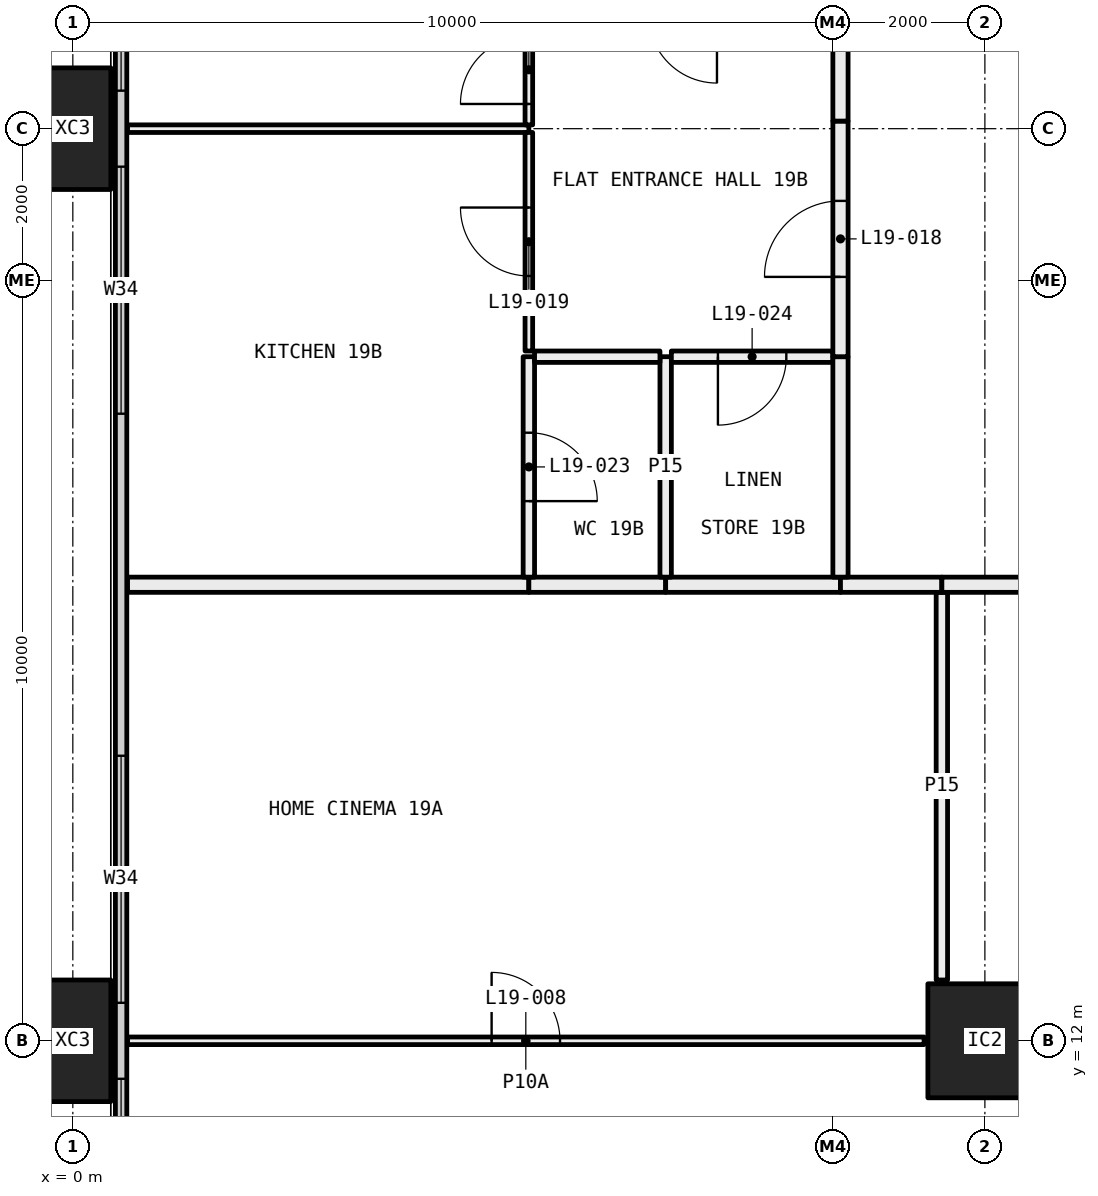
"""IFC4 building model, lengths in metres.
Left out: names, types, materials, properties, quantities, classifications, styles, units other than length and angle.
Written with IfcOpenShell. Run it as: python <this file> out.ifc"""

import sys

from ifc_helpers import new_model, si_unit, direction, frame, frame_2d, origin, origin_2d, place, context, subcontext, project, spatial, rectangle, hollow_rectangle, extrude, element, fill, save


model = new_model("IFC4")
c1 = context("Model", 3, precision=1e-05, world=origin(), true_north=direction((0.0, 1.0)))
c2 = subcontext(c1, "Body", "Model", "MODEL_VIEW")
j1 = project(units=[si_unit("LENGTHUNIT", "METRE"), si_unit("PLANEANGLEUNIT", "RADIAN")], contexts=[c1])
p1 = place(None, origin())
s1 = spatial("IfcSite", under=j1, at=p1, CompositionType="ELEMENT")
p2 = place(p1, origin())
s2 = spatial("IfcBuilding", under=s1, at=p2, CompositionType="ELEMENT")
p3 = place(p2, frame((0.0, 0.0, 78.3)))
s3 = spatial("IfcBuildingStorey", under=s2, at=p3, CompositionType="ELEMENT", Elevation=78.3)
for number, where, z_axis, x_axis in (
    (1, (0.0, 12.0, -0.4), (0.0, 0.0, 1.0), (0.0, 1.0, 0.0)),
    (2, (0.0, 24.0, -0.4), (0.0, 0.0, 1.0), (0.0, 1.0, 0.0)),
):
    element("IfcColumn", number, at=place(p3, frame(where, z_axis=z_axis, x_axis=x_axis)), inside=s3, PredefinedType="COLUMN", context=c2, shape_type="SweptSolid", body=[
        extrude(hollow_rectangle(XDim=1.6, YDim=1.0, WallThickness=0.065, at=origin_2d()), origin(), (0.0, 0.0, 1.0), 3.45),
    ])
p4 = place(p3, frame((12.0, 12.0, 0.0), z_axis=(0.0, 0.0, 1.0), x_axis=(1.0, 0.0, 0.0)))
e3 = element("IfcColumn", 3, at=p4, inside=s3, PredefinedType="COLUMN", context=c2, shape_type="SweptSolid", body=[
    extrude(hollow_rectangle(XDim=1.5, YDim=1.5, WallThickness=0.065, at=origin_2d()), origin(), (0.0, 0.0, 1.0), 3.05),
])
p5 = place(p3, frame((0.635, 6.71, 0.0), z_axis=(0.0, 0.0, 1.0), x_axis=(0.0, 1.0, 0.0)))
e4 = element("IfcWall", 4, at=p5, inside=s3, PredefinedType="ELEMENTEDWALL", context=c2, shape_type="SweptSolid", body=[
    extrude(rectangle(XDim=34.58, YDim=0.15, at=frame_2d((17.29, 0.0))), origin(), (0.0, 0.0, 1.0), 3.05),
])
p6 = place(p5, frame((0.29, 0.0, 0.45)))
e5 = element("IfcOpeningElement", 5, at=p6, cuts=e4, PredefinedType="OPENING", context=c2, shape_type="SweptSolid", body=[
    extrude(rectangle(XDim=4.5, YDim=2.55, at=frame_2d((2.25, 1.275))), frame((0.0, 0.085, 0.0), z_axis=(0.0, -1.0, 0.0), x_axis=(1.0, 0.0, 0.0)), (0.0, 0.0, 1.0), 0.17),
])
p7 = place(p5, frame((5.79, 0.0, 0.45)))
e6 = element("IfcOpeningElement", 6, at=p7, cuts=e4, PredefinedType="OPENING", context=c2, shape_type="SweptSolid", body=[
    extrude(rectangle(XDim=3.25, YDim=2.55, at=frame_2d((1.625, 1.275))), frame((0.0, 0.085, 0.0), z_axis=(0.0, -1.0, 0.0), x_axis=(1.0, 0.0, 0.0)), (0.0, 0.0, 1.0), 0.17),
])
p8 = place(p5, frame((13.54, 0.0, 0.45)))
e7 = element("IfcOpeningElement", 7, at=p8, cuts=e4, PredefinedType="OPENING", context=c2, shape_type="SweptSolid", body=[
    extrude(rectangle(XDim=3.25, YDim=2.55, at=frame_2d((1.625, 1.275))), frame((0.0, 0.085, 0.0), z_axis=(0.0, -1.0, 0.0), x_axis=(1.0, 0.0, 0.0)), (0.0, 0.0, 1.0), 0.17),
])
p9 = place(p5, frame((17.79, 0.0, 0.45)))
e8 = element("IfcOpeningElement", 8, at=p9, cuts=e4, PredefinedType="OPENING", context=c2, shape_type="SweptSolid", body=[
    extrude(rectangle(XDim=3.25, YDim=2.55, at=frame_2d((1.625, 1.275))), frame((0.0, 0.085, 0.0), z_axis=(0.0, -1.0, 0.0), x_axis=(1.0, 0.0, 0.0)), (0.0, 0.0, 1.0), 0.17),
])
p10 = place(p5, frame((26.79, 0.0, 0.45)))
e9 = element("IfcOpeningElement", 9, at=p10, cuts=e4, PredefinedType="OPENING", context=c2, shape_type="SweptSolid", body=[
    extrude(rectangle(XDim=2.0, YDim=2.55, at=frame_2d((1.0, 1.275))), frame((0.0, 0.085, 0.0), z_axis=(0.0, -1.0, 0.0), x_axis=(1.0, 0.0, 0.0)), (0.0, 0.0, 1.0), 0.17),
])
p11 = place(p5, frame((29.79, 0.0, 0.45)))
e10 = element("IfcOpeningElement", 10, at=p11, cuts=e4, PredefinedType="OPENING", context=c2, shape_type="SweptSolid", body=[
    extrude(rectangle(XDim=4.5, YDim=2.55, at=frame_2d((2.25, 1.275))), frame((0.0, 0.085, 0.0), z_axis=(0.0, -1.0, 0.0), x_axis=(1.0, 0.0, 0.0)), (0.0, 0.0, 1.0), 0.17),
])
p12 = place(p3, frame((11.2, 12.0, 0.0), z_axis=(0.0, 0.0, 1.0), x_axis=(-1.0, 0.0, 0.0)))
e11 = element("IfcWall", 11, at=p12, inside=s3, PredefinedType="PARTITIONING", context=c2, shape_type="SweptSolid", body=[
    extrude(rectangle(XDim=10.48, YDim=0.1, at=frame_2d((5.24, 0.0))), origin(), (0.0, 0.0, 1.0), 2.45),
])
p13 = place(p12, frame((4.79, 0.0, 0.0)))
e12 = element("IfcOpeningElement", 12, at=p13, cuts=e11, PredefinedType="OPENING", context=c2, shape_type="SweptSolid", body=[
    extrude(rectangle(XDim=0.9, YDim=2.1, at=frame_2d((0.45, 1.05))), frame((0.0, 0.06, 0.0), z_axis=(0.0, -1.0, 0.0), x_axis=(1.0, 0.0, 0.0)), (0.0, 0.0, 1.0), 0.12),
])
p14 = place(p3, frame((11.434, 12.8, 0.0), z_axis=(0.0, 0.0, 1.0), x_axis=(0.0, 1.0, 0.0)))
e13 = element("IfcWall", 13, at=p14, inside=s3, PredefinedType="PARTITIONING", context=c2, shape_type="SweptSolid", body=[
    extrude(rectangle(XDim=5.1, YDim=0.15, at=frame_2d((2.55, 0.0))), origin(), (0.0, 0.0, 1.0), 3.05),
])
p15 = place(p3, frame((6.0, 18.0, 0.0), z_axis=(0.0, 0.0, 1.0), x_axis=(-1.0, 0.0, 0.0)))
e14 = element("IfcWall", 14, at=p15, inside=s3, PredefinedType="PARTITIONING", context=c2, shape_type="SweptSolid", body=[
    extrude(rectangle(XDim=5.28, YDim=0.2, at=frame_2d((2.64, 0.0))), origin(), (0.0, 0.0, 1.0), 3.05),
])
p16 = place(p3, frame((7.8, 18.0, 0.0), z_axis=(0.0, 0.0, 1.0), x_axis=(-1.0, 0.0, 0.0)))
e15 = element("IfcWall", 15, at=p16, inside=s3, PredefinedType="PARTITIONING", context=c2, shape_type="SweptSolid", body=[
    extrude(rectangle(XDim=1.8, YDim=0.2, at=frame_2d((0.9, 0.0))), origin(), (0.0, 0.0, 1.0), 3.05),
])
p17 = place(p3, frame((10.1, 18.0, 0.0), z_axis=(0.0, 0.0, 1.0), x_axis=(-1.0, 0.0, 0.0)))
e16 = element("IfcWall", 16, at=p17, inside=s3, PredefinedType="PARTITIONING", context=c2, shape_type="SweptSolid", body=[
    extrude(rectangle(XDim=2.3, YDim=0.2, at=frame_2d((1.15, 0.0))), origin(), (0.0, 0.0, 1.0), 3.05),
])
p18 = place(p3, frame((11.434, 18.0, 0.0), z_axis=(0.0, 0.0, 1.0), x_axis=(-1.0, 0.0, 0.0)))
e17 = element("IfcWall", 17, at=p18, inside=s3, PredefinedType="PARTITIONING", context=c2, shape_type="SweptSolid", body=[
    extrude(rectangle(XDim=1.334, YDim=0.2, at=frame_2d((0.667, 0.0))), origin(), (0.0, 0.0, 1.0), 3.05),
])
p19 = place(p3, frame((18.0, 18.0, 0.0), z_axis=(0.0, 0.0, 1.0), x_axis=(-1.0, 0.0, 0.0)))
e18 = element("IfcWall", 18, at=p19, inside=s3, PredefinedType="PARTITIONING", context=c2, shape_type="SweptSolid", body=[
    extrude(rectangle(XDim=6.566, YDim=0.2, at=frame_2d((3.283, 0.0))), origin(), (0.0, 0.0, 1.0), 3.05),
])
p20 = place(p3, frame((6.0, 24.0, 0.0), z_axis=(0.0, 0.0, 1.0), x_axis=(-1.0, 0.0, 0.0)))
e19 = element("IfcWall", 19, at=p20, inside=s3, PredefinedType="PARTITIONING", context=c2, shape_type="SweptSolid", body=[
    extrude(rectangle(XDim=5.28, YDim=0.1, at=frame_2d((2.64, 0.0))), origin(), (0.0, 0.0, 1.0), 2.45),
])
p21 = place(p3, frame((6.0, 18.1, 0.0), z_axis=(0.0, 0.0, 1.0), x_axis=(0.0, 1.0, 0.0)))
e20 = element("IfcWall", 20, at=p21, inside=s3, PredefinedType="PARTITIONING", context=c2, shape_type="SweptSolid", body=[
    extrude(rectangle(XDim=2.9, YDim=0.15, at=frame_2d((1.45, 0.0))), origin(), (0.0, 0.0, 1.0), 3.05),
])
p22 = place(p21, frame((1.0, 0.0, 0.0)))
e21 = element("IfcOpeningElement", 21, at=p22, cuts=e20, PredefinedType="OPENING", context=c2, shape_type="SweptSolid", body=[
    extrude(rectangle(XDim=0.9, YDim=2.1, at=frame_2d((0.45, 1.05))), frame((0.0, 0.085, 0.0), z_axis=(0.0, -1.0, 0.0), x_axis=(1.0, 0.0, 0.0)), (0.0, 0.0, 1.0), 0.17),
])
p23 = place(p3, frame((6.0, 21.075, 0.0), z_axis=(0.0, 0.0, 1.0), x_axis=(0.0, 1.0, 0.0)))
e22 = element("IfcWall", 22, at=p23, inside=s3, PredefinedType="PARTITIONING", context=c2, shape_type="SweptSolid", body=[
    extrude(rectangle(XDim=2.875, YDim=0.1, at=frame_2d((1.438, 0.0))), origin(), (0.0, 0.0, 1.0), 2.45),
])
p24 = place(p23, frame((0.988, 0.0, 0.0)))
e23 = element("IfcOpeningElement", 23, at=p24, cuts=e22, PredefinedType="OPENING", context=c2, shape_type="SweptSolid", body=[
    extrude(rectangle(XDim=0.9, YDim=2.1, at=frame_2d((0.45, 1.05))), frame((0.0, 0.06, 0.0), z_axis=(0.0, -1.0, 0.0), x_axis=(1.0, 0.0, 0.0)), (0.0, 0.0, 1.0), 0.12),
])
p25 = place(p3, frame((6.0, 24.05, 0.0), z_axis=(0.0, 0.0, 1.0), x_axis=(0.0, 1.0, 0.0)))
e24 = element("IfcWall", 24, at=p25, inside=s3, PredefinedType="PARTITIONING", context=c2, shape_type="SweptSolid", body=[
    extrude(rectangle(XDim=1.45, YDim=0.1, at=frame_2d((0.725, 0.0))), origin(), (0.0, 0.0, 1.0), 2.45),
])
p26 = place(p25, frame((0.275, 0.0, 0.0)))
e25 = element("IfcOpeningElement", 25, at=p26, cuts=e24, PredefinedType="OPENING", context=c2, shape_type="SweptSolid", body=[
    extrude(rectangle(XDim=0.9, YDim=2.1, at=frame_2d((0.45, 1.05))), frame((0.0, 0.06, 0.0), z_axis=(0.0, -1.0, 0.0), x_axis=(1.0, 0.0, 0.0)), (0.0, 0.0, 1.0), 0.12),
])
p27 = place(p3, frame((7.8, 18.1, 0.0), z_axis=(0.0, 0.0, 1.0), x_axis=(0.0, 1.0, 0.0)))
e26 = element("IfcWall", 26, at=p27, inside=s3, PredefinedType="PARTITIONING", context=c2, shape_type="SweptSolid", body=[
    extrude(rectangle(XDim=2.9, YDim=0.15, at=frame_2d((1.45, 0.0))), origin(), (0.0, 0.0, 1.0), 3.05),
])
p28 = place(p3, frame((7.725, 21.0, 0.0), z_axis=(0.0, 0.0, 1.0), x_axis=(-1.0, 0.0, 0.0)))
e27 = element("IfcWall", 27, at=p28, inside=s3, PredefinedType="PARTITIONING", context=c2, shape_type="SweptSolid", body=[
    extrude(rectangle(XDim=1.65, YDim=0.15, at=frame_2d((0.825, 0.0))), origin(), (0.0, 0.0, 1.0), 3.05),
])
p29 = place(p3, frame((10.0, 21.0, 0.0), z_axis=(0.0, 0.0, 1.0), x_axis=(-1.0, 0.0, 0.0)))
e28 = element("IfcWall", 28, at=p29, inside=s3, PredefinedType="PARTITIONING", context=c2, shape_type="SweptSolid", body=[
    extrude(rectangle(XDim=2.125, YDim=0.15, at=frame_2d((1.062, 0.0))), origin(), (0.0, 0.0, 1.0), 3.05),
])
p30 = place(p29, frame((0.613, 0.0, 0.0)))
e29 = element("IfcOpeningElement", 29, at=p30, cuts=e28, PredefinedType="OPENING", context=c2, shape_type="SweptSolid", body=[
    extrude(rectangle(XDim=0.9, YDim=2.1, at=frame_2d((0.45, 1.05))), frame((0.0, 0.085, 0.0), z_axis=(0.0, -1.0, 0.0), x_axis=(1.0, 0.0, 0.0)), (0.0, 0.0, 1.0), 0.17),
])
p31 = place(p3, frame((10.1, 18.1, 0.0), z_axis=(0.0, 0.0, 1.0), x_axis=(0.0, 1.0, 0.0)))
e30 = element("IfcWall", 30, at=p31, inside=s3, PredefinedType="PARTITIONING", context=c2, shape_type="SweptSolid", body=[
    extrude(rectangle(XDim=2.9, YDim=0.2, at=frame_2d((1.45, 0.0))), origin(), (0.0, 0.0, 1.0), 3.05),
])
p32 = place(p3, frame((10.1, 21.0, 0.0), z_axis=(0.0, 0.0, 1.0), x_axis=(0.0, 1.0, 0.0)))
e31 = element("IfcWall", 31, at=p32, inside=s3, PredefinedType="PARTITIONING", context=c2, shape_type="SweptSolid", body=[
    extrude(rectangle(XDim=3.1, YDim=0.2, at=frame_2d((1.55, 0.0))), origin(), (0.0, 0.0, 1.0), 2.45),
])
p33 = place(p32, frame((1.05, 0.0, 0.0)))
e32 = element("IfcOpeningElement", 32, at=p33, cuts=e31, PredefinedType="OPENING", context=c2, shape_type="SweptSolid", body=[
    extrude(rectangle(XDim=1.0, YDim=2.1, at=frame_2d((0.5, 1.05))), frame((0.0, 0.11, 0.0), z_axis=(0.0, -1.0, 0.0), x_axis=(1.0, 0.0, 0.0)), (0.0, 0.0, 1.0), 0.22),
])
p34 = place(p3, frame((10.1, 24.1, 0.0), z_axis=(0.0, 0.0, 1.0), x_axis=(0.0, 1.0, 0.0)))
e33 = element("IfcWall", 33, at=p34, inside=s3, PredefinedType="PARTITIONING", context=c2, shape_type="SweptSolid", body=[
    extrude(rectangle(XDim=1.4, YDim=0.2, at=frame_2d((0.7, 0.0))), origin(), (0.0, 0.0, 1.0), 3.05),
])
p35 = place(p6, origin())
e34 = element("IfcWindow", 34, at=p35, inside=s3, PartitioningType="SINGLE_PANEL", PredefinedType="WINDOW", context=c2, shape_type="SweptSolid", body=[
    extrude(rectangle(XDim=4.5, YDim=2.55, at=frame_2d((2.25, 1.275))), frame((0.0, 0.03, 0.0), z_axis=(0.0, -1.0, 0.0), x_axis=(1.0, 0.0, 0.0)), (0.0, 0.0, 1.0), 0.06),
])
fill(e5, e34)
p36 = place(p7, origin())
e35 = element("IfcWindow", 35, at=p36, inside=s3, PartitioningType="SINGLE_PANEL", PredefinedType="WINDOW", context=c2, shape_type="SweptSolid", body=[
    extrude(rectangle(XDim=3.25, YDim=2.55, at=frame_2d((1.625, 1.275))), frame((0.0, 0.03, 0.0), z_axis=(0.0, -1.0, 0.0), x_axis=(1.0, 0.0, 0.0)), (0.0, 0.0, 1.0), 0.06),
])
fill(e6, e35)
p37 = place(p8, origin())
e36 = element("IfcWindow", 36, at=p37, inside=s3, PartitioningType="SINGLE_PANEL", PredefinedType="WINDOW", context=c2, shape_type="SweptSolid", body=[
    extrude(rectangle(XDim=3.25, YDim=2.55, at=frame_2d((1.625, 1.275))), frame((0.0, 0.03, 0.0), z_axis=(0.0, -1.0, 0.0), x_axis=(1.0, 0.0, 0.0)), (0.0, 0.0, 1.0), 0.06),
])
fill(e7, e36)
p38 = place(p9, origin())
e37 = element("IfcWindow", 37, at=p38, inside=s3, PartitioningType="SINGLE_PANEL", PredefinedType="WINDOW", context=c2, shape_type="SweptSolid", body=[
    extrude(rectangle(XDim=3.25, YDim=2.55, at=frame_2d((1.625, 1.275))), frame((0.0, 0.03, 0.0), z_axis=(0.0, -1.0, 0.0), x_axis=(1.0, 0.0, 0.0)), (0.0, 0.0, 1.0), 0.06),
])
fill(e8, e37)
p39 = place(p13, frame((0.9, 0.0, 0.0), x_axis=(-1.0, 0.0, 0.0)))
e38 = element("IfcDoor", 38, at=p39, inside=s3, OperationType="SINGLE_SWING_RIGHT", PredefinedType="DOOR", context=c2, shape_type="SweptSolid", body=[
    extrude(rectangle(XDim=0.9, YDim=2.1, at=frame_2d((0.45, 1.05))), frame((0.0, 0.025, 0.0), z_axis=(0.0, -1.0, 0.0), x_axis=(1.0, 0.0, 0.0)), (0.0, 0.0, 1.0), 0.05),
])
fill(e12, e38)
p40 = place(p33, origin())
e39 = element("IfcDoor", 39, at=p40, inside=s3, OperationType="SINGLE_SWING_RIGHT", PredefinedType="DOOR", context=c2, shape_type="SweptSolid", body=[
    extrude(rectangle(XDim=1.0, YDim=2.1, at=frame_2d((0.5, 1.05))), frame((0.0, 0.025, 0.0), z_axis=(0.0, -1.0, 0.0), x_axis=(1.0, 0.0, 0.0)), (0.0, 0.0, 1.0), 0.05),
])
fill(e32, e39)
p41 = place(p24, origin())
e40 = element("IfcDoor", 40, at=p41, inside=s3, OperationType="SINGLE_SWING_LEFT", PredefinedType="DOOR", context=c2, shape_type="SweptSolid", body=[
    extrude(rectangle(XDim=0.9, YDim=2.1, at=frame_2d((0.45, 1.05))), frame((0.0, 0.025, 0.0), z_axis=(0.0, -1.0, 0.0), x_axis=(1.0, 0.0, 0.0)), (0.0, 0.0, 1.0), 0.05),
])
fill(e23, e40)
p42 = place(p26, origin())
e41 = element("IfcDoor", 41, at=p42, inside=s3, OperationType="SINGLE_SWING_RIGHT", PredefinedType="DOOR", context=c2, shape_type="SweptSolid", body=[
    extrude(rectangle(XDim=0.9, YDim=2.1, at=frame_2d((0.45, 1.05))), frame((0.0, 0.025, 0.0), z_axis=(0.0, -1.0, 0.0), x_axis=(1.0, 0.0, 0.0)), (0.0, 0.0, 1.0), 0.05),
])
fill(e25, e41)
p43 = place(p22, frame((0.9, 0.0, 0.0), x_axis=(-1.0, 0.0, 0.0)))
e42 = element("IfcDoor", 42, at=p43, inside=s3, OperationType="SINGLE_SWING_LEFT", PredefinedType="DOOR", context=c2, shape_type="SweptSolid", body=[
    extrude(rectangle(XDim=0.9, YDim=2.1, at=frame_2d((0.45, 1.05))), frame((0.0, 0.025, 0.0), z_axis=(0.0, -1.0, 0.0), x_axis=(1.0, 0.0, 0.0)), (0.0, 0.0, 1.0), 0.05),
])
fill(e21, e42)
p44 = place(p30, origin())
e43 = element("IfcDoor", 43, at=p44, inside=s3, OperationType="SINGLE_SWING_LEFT", PredefinedType="DOOR", context=c2, shape_type="SweptSolid", body=[
    extrude(rectangle(XDim=0.9, YDim=2.1, at=frame_2d((0.45, 1.05))), frame((0.0, 0.025, 0.0), z_axis=(0.0, -1.0, 0.0), x_axis=(1.0, 0.0, 0.0)), (0.0, 0.0, 1.0), 0.05),
])
fill(e29, e43)
save(model, sys.argv[1])
